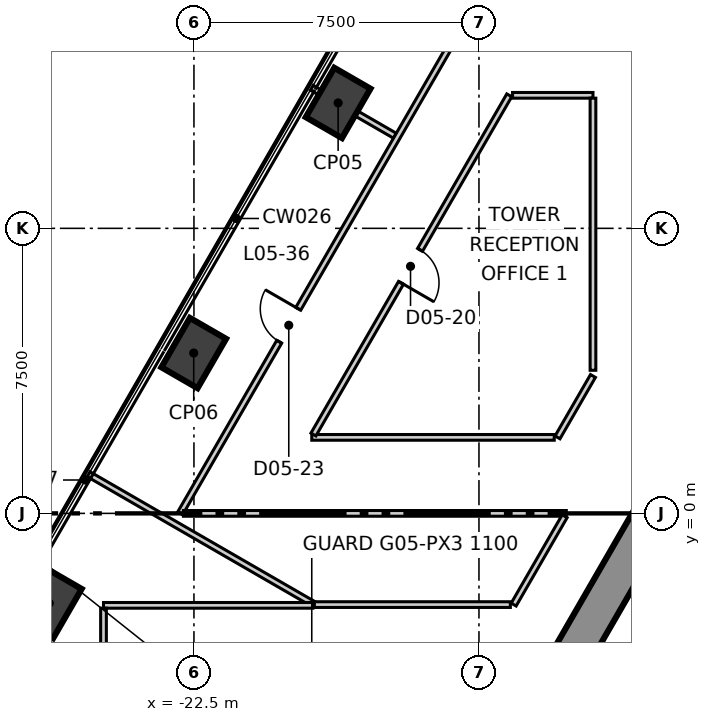
"""IFC4 building model, lengths in metres.
Left out: names, types, materials, properties, quantities, classifications, styles, units other than length and angle.
Written with IfcOpenShell. Run it as: python <this file> out.ifc"""

import sys

from ifc_helpers import new_model, si_unit, direction, frame, frame_2d, origin, origin_2d, place, context, subcontext, project, spatial, polyline, rectangle, outline, extrude, element, fill, save


model = new_model("IFC4")
c1 = context("Model", 3, precision=1e-05, world=origin(), true_north=direction((0.0, 1.0)))
c2 = subcontext(c1, "Body", "Model", "MODEL_VIEW")
j1 = project(units=[si_unit("LENGTHUNIT", "METRE"), si_unit("PLANEANGLEUNIT", "RADIAN")], contexts=[c1])
p1 = place(None, origin())
s1 = spatial("IfcSite", under=j1, at=p1, CompositionType="ELEMENT")
p2 = place(p1, origin())
s2 = spatial("IfcBuilding", under=s1, at=p2, CompositionType="ELEMENT")
p3 = place(p2, frame((0.0, 0.0, 30.3)))
s3 = spatial("IfcBuildingStorey", under=s2, at=p3, CompositionType="ELEMENT", Elevation=30.3)
p4 = place(p3, frame((-1.617, 15.2, -0.4), z_axis=(0.0, 0.0, 1.0), x_axis=(-0.499992141631, -0.866029940768, 0.0)))
e1 = element("IfcWall", 1, at=p4, inside=s3, PredefinedType="SHEAR", context=c2, shape_type="SweptSolid", body=[
    extrude(outline(polyline([(-0.289, -0.499), (1.656, -0.499), (3.601, -0.499), (5.547, -0.499), (7.492, -0.499), (9.437, -0.5), (11.382, -0.5), (13.328, -0.5), (15.273, -0.5), (17.218, -0.5), (19.163, -0.5), (21.109, -0.5), (23.054, -0.5), (24.999, -0.5), (24.422, 0.5), (22.566, 0.5), (20.709, 0.5), (18.853, 0.5), (16.997, 0.5), (15.14, 0.5), (13.284, 0.5), (11.427, 0.5), (9.571, 0.5), (7.715, 0.5), (5.858, 0.5), (4.002, 0.5), (2.146, 0.5), (0.289, 0.5), (-0.289, -0.499)])), origin(), (0.0, 0.0, 1.0), 5.1),
])
p5 = place(p4, frame((11.805, 0.0, 0.4)))
e2 = element("IfcOpeningElement", 2, at=p5, cuts=e1, PredefinedType="OPENING", context=c2, shape_type="SweptSolid", body=[
    extrude(rectangle(XDim=1.1, YDim=2.1, at=frame_2d((0.55, 1.05))), frame((0.0, 0.51, 0.0), z_axis=(0.0, -1.0, 0.0), x_axis=(1.0, 0.0, 0.0)), (0.0, 0.0, 1.0), 1.02),
])
for number, where, z_axis, x_axis in (
    (3, (-18.706, 10.8, -0.4), (0.0, 0.0, 1.0), (0.5, 0.866, 0.0)),
    (4, (-22.506, 4.219, -0.4), (0.0, 0.0, 1.0), (0.5, 0.866, 0.0)),
    (5, (-26.306, -2.362, -0.4), (0.0, 0.0, 1.0), (0.5, 0.866, 0.0)),
):
    element("IfcColumn", number, at=place(p3, frame(where, z_axis=z_axis, x_axis=x_axis)), inside=s3, PredefinedType="COLUMN", context=c2, shape_type="SweptSolid", body=[
        extrude(rectangle(XDim=1.5, YDim=1.1, at=origin_2d()), origin(), (0.0, 0.0, 1.0), 5.1),
    ])
p6 = place(p3, frame((-25.271, 1.03, 0.0), z_axis=(0.0, 0.0, 1.0), x_axis=(0.865997947348, -0.500047552927, 0.0)))
e6 = element("IfcWall", 6, at=p6, inside=s3, PredefinedType="PARTITIONING", context=c2, shape_type="SweptSolid", body=[
    extrude(rectangle(XDim=6.825, YDim=0.15, at=frame_2d((3.413, 0.0))), origin(), (0.0, 0.0, 1.0), 4.7),
])
p7 = place(p3, frame((-19.399, 11.2, 0.0), z_axis=(0.0, 0.0, 1.0), x_axis=(0.865979509711, -0.500079482444, 0.0)))
e7 = element("IfcWall", 7, at=p7, inside=s3, PredefinedType="PARTITIONING", context=c2, shape_type="SweptSolid", body=[
    extrude(rectangle(XDim=2.525, YDim=0.15, at=frame_2d((1.263, 0.0))), origin(), (0.0, 0.0, 1.0), 4.2),
])
p8 = place(p3, frame((-22.863, 0.0, 0.0), z_axis=(0.0, 0.0, 1.0), x_axis=(0.500027479704, 0.866009537788, 0.0)))
e8 = element("IfcWall", 8, at=p8, inside=s3, PredefinedType="PARTITIONING", context=c2, shape_type="SweptSolid", body=[
    extrude(rectangle(XDim=15.011, YDim=0.15, at=frame_2d((7.506, 0.0))), origin(), (0.0, 0.0, 1.0), 4.7),
])
p9 = place(p8, frame((5.216, 0.0, 0.0)))
e9 = element("IfcOpeningElement", 9, at=p9, cuts=e8, PredefinedType="OPENING", context=c2, shape_type="SweptSolid", body=[
    extrude(rectangle(XDim=1.0, YDim=2.1, at=frame_2d((0.5, 1.05))), frame((0.0, 0.085, 0.0), z_axis=(0.0, -1.0, 0.0), x_axis=(1.0, 0.0, 0.0)), (0.0, 0.0, 1.0), 0.17),
])
p10 = place(p3, frame((-22.777, 0.0, 0.0), z_axis=(0.0, 0.0, 1.0), x_axis=(1.0, 0.0, 0.0)))
e10 = element("IfcWall", 10, at=p10, inside=s3, PredefinedType="PARTITIONING", context=c2, shape_type="SweptSolid", body=[
    extrude(rectangle(XDim=10.075, YDim=0.15, at=frame_2d((5.038, 0.0))), origin(), (0.0, 0.0, 1.0), 4.7),
])
p11 = place(p3, frame((-14.087, -2.4, 0.0), z_axis=(0.0, 0.0, 1.0), x_axis=(0.499856297154, 0.866108354766, 0.0)))
e11 = element("IfcWall", 11, at=p11, inside=s3, PredefinedType="PARTITIONING", context=c2, shape_type="SweptSolid", body=[
    extrude(rectangle(XDim=2.684, YDim=0.15, at=frame_2d((1.342, 0.0))), origin(), (0.0, 0.0, 1.0), 4.7),
])
p12 = place(p3, frame((-19.333, -2.4, 0.0), z_axis=(0.0, 0.0, 1.0), x_axis=(1.0, 0.0, 0.0)))
e12 = element("IfcWall", 12, at=p12, inside=s3, PredefinedType="PARTITIONING", context=c2, shape_type="SweptSolid", body=[
    extrude(rectangle(XDim=5.159, YDim=0.15, at=frame_2d((2.58, 0.0))), origin(), (0.0, 0.0, 1.0), 4.7),
])
p13 = place(p3, frame((-24.88, -2.42, 0.0), z_axis=(0.0, 0.0, 1.0), x_axis=(1.0, 0.0, 0.0)))
e13 = element("IfcWall", 13, at=p13, inside=s3, PredefinedType="PARTITIONING", context=c2, shape_type="SweptSolid", body=[
    extrude(rectangle(XDim=5.51, YDim=0.15, at=frame_2d((2.755, 0.0))), origin(), (0.0, 0.0, 1.0), 4.1),
])
p14 = place(p3, frame((-24.88, -9.58, 0.0), z_axis=(0.0, 0.0, 1.0), x_axis=(0.0, 1.0, 0.0)))
e14 = element("IfcWall", 14, at=p14, inside=s3, PredefinedType="PARTITIONING", context=c2, shape_type="SweptSolid", body=[
    extrude(rectangle(XDim=7.085, YDim=0.15, at=frame_2d((3.542, 0.0))), origin(), (0.0, 0.0, 1.0), 4.7),
])
p15 = place(p14, frame((3.08, 0.0, 0.0)))
e15 = element("IfcOpeningElement", 15, at=p15, cuts=e14, PredefinedType="OPENING", context=c2, shape_type="SweptSolid", body=[
    extrude(rectangle(XDim=1.0, YDim=2.1, at=frame_2d((0.5, 1.05))), frame((0.0, 0.085, 0.0), z_axis=(0.0, -1.0, 0.0), x_axis=(1.0, 0.0, 0.0)), (0.0, 0.0, 1.0), 0.17),
])
p16 = place(p3, frame((-12.933, 2.0, 0.0), z_axis=(0.0, 0.0, 1.0), x_axis=(0.500277597875, 0.865865073245, 0.0)))
e16 = element("IfcWall", 16, at=p16, inside=s3, PredefinedType="PARTITIONING", context=c2, shape_type="SweptSolid", body=[
    extrude(rectangle(XDim=1.865, YDim=0.15, at=frame_2d((0.933, 0.0))), origin(), (0.0, 0.0, 1.0), 4.7),
])
p17 = place(p3, frame((-19.399, 2.0, 0.0), z_axis=(0.0, 0.0, 1.0), x_axis=(1.0, 0.0, 0.0)))
e17 = element("IfcWall", 17, at=p17, inside=s3, PredefinedType="PARTITIONING", context=c2, shape_type="SweptSolid", body=[
    extrude(rectangle(XDim=6.38, YDim=0.15, at=frame_2d((3.19, 0.0))), origin(), (0.0, 0.0, 1.0), 4.7),
])
p18 = place(p3, frame((-19.356, 2.075, 0.0), z_axis=(0.0, 0.0, 1.0), x_axis=(0.500014323953, 0.866017133688, 0.0)))
e18 = element("IfcWall", 18, at=p18, inside=s3, PredefinedType="PARTITIONING", context=c2, shape_type="SweptSolid", body=[
    extrude(rectangle(XDim=10.306, YDim=0.15, at=frame_2d((5.153, 0.0))), origin(), (0.0, 0.0, 1.0), 4.7),
])
p19 = place(p18, frame((4.61, 0.0, 0.0)))
e19 = element("IfcOpeningElement", 19, at=p19, cuts=e18, PredefinedType="OPENING", context=c2, shape_type="SweptSolid", body=[
    extrude(rectangle(XDim=1.0, YDim=2.1, at=frame_2d((0.5, 1.05))), frame((0.0, 0.085, 0.0), z_axis=(0.0, -1.0, 0.0), x_axis=(1.0, 0.0, 0.0)), (0.0, 0.0, 1.0), 0.17),
])
p20 = place(p3, frame((-14.116, 11.0, 0.0), z_axis=(0.0, 0.0, 1.0), x_axis=(1.0, 0.0, 0.0)))
e20 = element("IfcWall", 20, at=p20, inside=s3, PredefinedType="PARTITIONING", context=c2, shape_type="SweptSolid", body=[
    extrude(rectangle(XDim=2.116, YDim=0.15, at=frame_2d((1.058, 0.0))), origin(), (0.0, 0.0, 1.0), 4.7),
])
p21 = place(p3, frame((-12.0, 3.765, 0.0), z_axis=(0.0, 0.0, 1.0), x_axis=(0.0, 1.0, 0.0)))
e21 = element("IfcWall", 21, at=p21, inside=s3, PredefinedType="PARTITIONING", context=c2, shape_type="SweptSolid", body=[
    extrude(rectangle(XDim=7.16, YDim=0.15, at=frame_2d((3.58, 0.0))), origin(), (0.0, 0.0, 1.0), 4.7),
])
p22 = place(p3, frame((-13.946, -6.204, 0.0), z_axis=(0.0, 0.0, 1.0), x_axis=(0.866036527536, 0.499980732602, 0.0)))
e22 = element("IfcWall", 22, at=p22, inside=s3, PredefinedType="SOLIDWALL", context=c2, shape_type="SweptSolid", body=[
    extrude(rectangle(XDim=8.564, YDim=0.2, at=frame_2d((4.282, 0.0))), origin(), (0.0, 0.0, 1.0), 4.7),
])
p23 = place(p19, origin())
e23 = element("IfcDoor", 23, at=p23, inside=s3, OperationType="SINGLE_SWING_LEFT", PredefinedType="DOOR", context=c2, shape_type="SweptSolid", body=[
    extrude(rectangle(XDim=1.0, YDim=2.1, at=frame_2d((0.5, 1.05))), frame((0.0, 0.025, 0.0), z_axis=(0.0, -1.0, 0.0), x_axis=(1.0, 0.0, 0.0)), (0.0, 0.0, 1.0), 0.05),
])
fill(e19, e23)
p24 = place(p9, origin())
e24 = element("IfcDoor", 24, at=p24, inside=s3, OperationType="SINGLE_SWING_LEFT", PredefinedType="DOOR", context=c2, shape_type="SweptSolid", body=[
    extrude(rectangle(XDim=1.0, YDim=2.1, at=frame_2d((0.5, 1.05))), frame((0.0, 0.025, 0.0), z_axis=(0.0, -1.0, 0.0), x_axis=(1.0, 0.0, 0.0)), (0.0, 0.0, 1.0), 0.05),
])
fill(e9, e24)
save(model, sys.argv[1])
